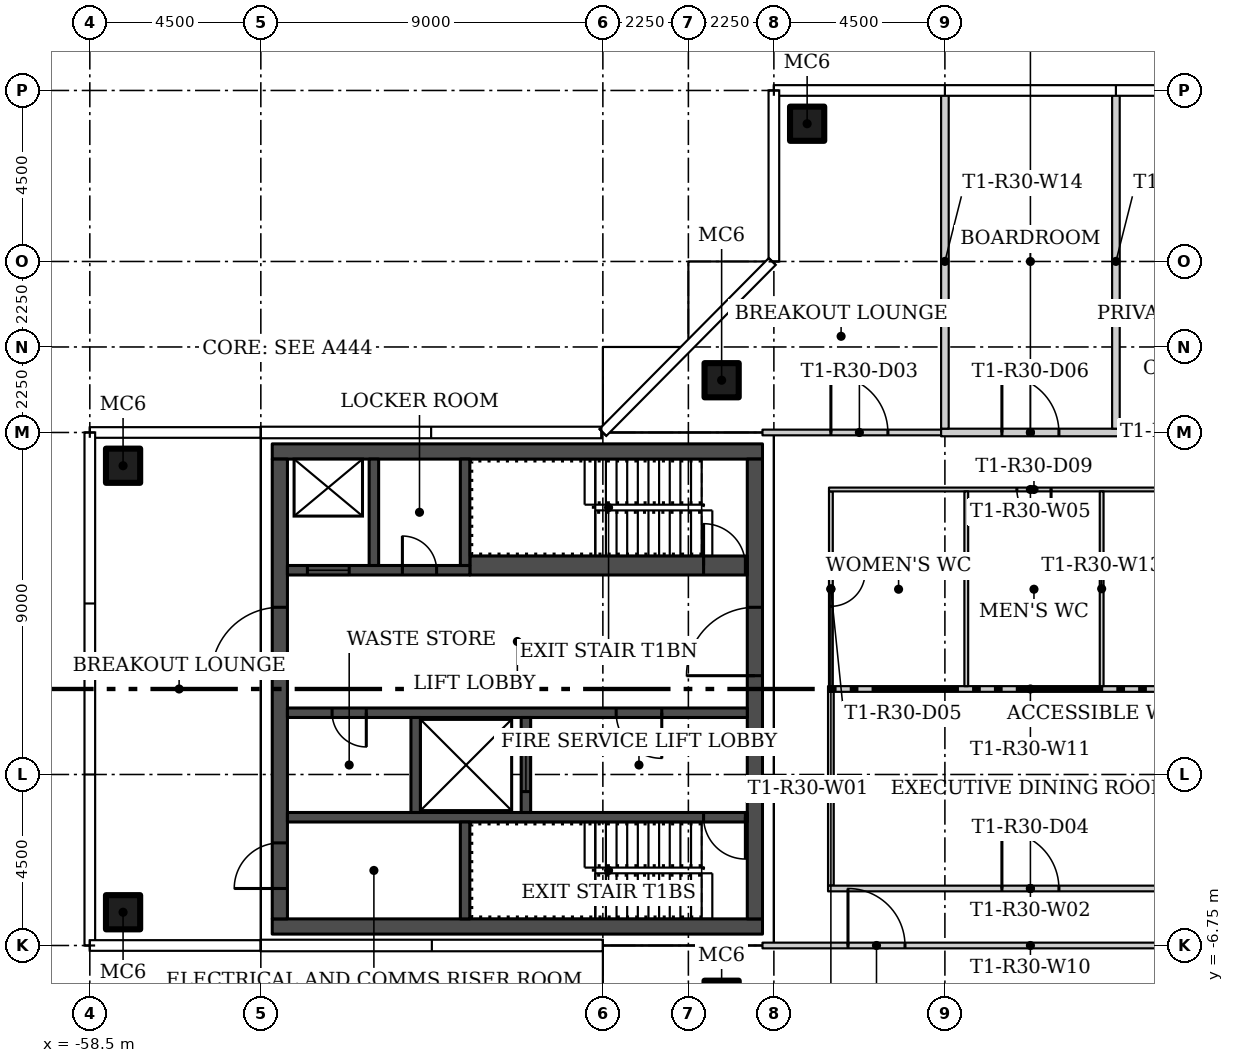
"""IFC4 building model, lengths in metres.
Left out: names, types, materials, properties, quantities, classifications, styles, units other than length and angle.
Written with IfcOpenShell. Run it as: python <this file> out.ifc"""

import sys

from ifc_helpers import new_model, si_unit, direction, frame, frame_2d, origin, origin_2d, place, context, subcontext, project, spatial, rectangle, hollow_rectangle, extrude, element, fill, save


model = new_model("IFC4")
c1 = context("Model", 3, precision=1e-05, world=origin(), true_north=direction((0.0, 1.0)))
c2 = subcontext(c1, "Body", "Model", "MODEL_VIEW")
j1 = project(units=[si_unit("LENGTHUNIT", "METRE"), si_unit("PLANEANGLEUNIT", "RADIAN")], contexts=[c1])
p1 = place(None, origin())
s1 = spatial("IfcSite", under=j1, at=p1, CompositionType="ELEMENT")
p2 = place(p1, origin())
s2 = spatial("IfcBuilding", under=s1, at=p2, CompositionType="ELEMENT")
p3 = place(p2, frame((0.0, 0.0, 269.4)))
s3 = spatial("IfcBuildingStorey", under=s2, at=p3, CompositionType="ELEMENT", Elevation=269.4)
for number, where in (
    (1, (-41.875, 8.125, 0.0)),
    (2, (-41.875, -8.125, 0.0)),
    (3, (-57.625, -5.875, 0.0)),
    (4, (-57.625, 5.875, 0.0)),
    (5, (-39.625, 14.875, 0.0)),
):
    element("IfcColumn", number, at=place(p3, frame(where)), inside=s3, PredefinedType="COLUMN", context=c2, shape_type="SweptSolid", body=[
        extrude(hollow_rectangle(XDim=0.9, YDim=0.9, WallThickness=0.036, at=origin_2d()), origin(), (0.0, 0.0, 1.0), 3.45),
    ])
p4 = place(p3, frame((-39.0, -0.075, 0.0), z_axis=(0.0, 0.0, 1.0), x_axis=(0.0, -1.0, 0.0)))
e6 = element("IfcWall", 6, at=p4, inside=s3, PredefinedType="PARTITIONING", context=c2, shape_type="SweptSolid", body=[
    extrude(rectangle(XDim=5.1, YDim=0.15, at=frame_2d((2.55, 0.0))), origin(), (0.0, 0.0, 1.0), 3.45),
])
p5 = place(p3, frame((-39.075, -5.25, 0.0)))
e7 = element("IfcWall", 7, at=p5, inside=s3, PredefinedType="PARTITIONING", context=c2, shape_type="SweptSolid", body=[
    extrude(rectangle(XDim=10.65, YDim=0.15, at=frame_2d((5.325, 0.0))), origin(), (0.0, 0.0, 1.0), 3.45),
])
p6 = place(p5, frame((4.575, 0.0, 0.0)))
e8 = element("IfcOpeningElement", 8, at=p6, cuts=e7, PredefinedType="OPENING", context=c2, shape_type="SweptSolid", body=[
    extrude(rectangle(XDim=1.5, YDim=2.1, at=frame_2d((0.75, 1.05))), frame((0.0, 0.085, 0.0), z_axis=(0.0, -1.0, 0.0), x_axis=(1.0, 0.0, 0.0)), (0.0, 0.0, 1.0), 0.17),
])
p7 = place(p3, frame((-39.0, 5.2, 0.0), z_axis=(0.0, 0.0, 1.0), x_axis=(0.0, -1.0, 0.0)))
e9 = element("IfcWall", 9, at=p7, inside=s3, PredefinedType="PARTITIONING", context=c2, shape_type="SweptSolid", body=[
    extrude(rectangle(XDim=5.125, YDim=0.1, at=frame_2d((2.562, 0.0))), origin(), (0.0, 0.0, 1.0), 3.45),
])
p8 = place(p7, frame((2.125, 0.0, 0.0)))
e10 = element("IfcOpeningElement", 10, at=p8, cuts=e9, PredefinedType="OPENING", context=c2, shape_type="SweptSolid", body=[
    extrude(rectangle(XDim=0.9, YDim=2.1, at=frame_2d((0.45, 1.05))), frame((0.0, 0.06, 0.0), z_axis=(0.0, -1.0, 0.0), x_axis=(1.0, 0.0, 0.0)), (0.0, 0.0, 1.0), 0.12),
])
p9 = place(p3, frame((-28.45, 5.25, 0.0), z_axis=(0.0, 0.0, 1.0), x_axis=(-1.0, 0.0, 0.0)))
e11 = element("IfcWall", 11, at=p9, inside=s3, PredefinedType="PARTITIONING", context=c2, shape_type="SweptSolid", body=[
    extrude(rectangle(XDim=10.6, YDim=0.1, at=frame_2d((5.3, 0.0))), origin(), (0.0, 0.0, 1.0), 3.45),
])
p10 = place(p9, frame((4.756, 0.0, 0.0)))
e12 = element("IfcOpeningElement", 12, at=p10, cuts=e11, PredefinedType="OPENING", context=c2, shape_type="SweptSolid", body=[
    extrude(rectangle(XDim=0.9, YDim=2.1, at=frame_2d((0.45, 1.05))), frame((0.0, 0.06, 0.0), z_axis=(0.0, -1.0, 0.0), x_axis=(1.0, 0.0, 0.0)), (0.0, 0.0, 1.0), 0.12),
])
p11 = place(p3, frame((-40.8, 6.75, 0.0)))
e13 = element("IfcWall", 13, at=p11, inside=s3, PredefinedType="PARTITIONING", context=c2, shape_type="SweptSolid", body=[
    extrude(rectangle(XDim=4.9, YDim=0.15, at=frame_2d((2.45, 0.0))), origin(), (0.0, 0.0, 1.0), 3.45),
])
p12 = place(p11, frame((1.8, 0.0, 0.0)))
e14 = element("IfcOpeningElement", 14, at=p12, cuts=e13, PredefinedType="OPENING", context=c2, shape_type="SweptSolid", body=[
    extrude(rectangle(XDim=1.5, YDim=2.1, at=frame_2d((0.75, 1.05))), frame((0.0, 0.085, 0.0), z_axis=(0.0, -1.0, 0.0), x_axis=(1.0, 0.0, 0.0)), (0.0, 0.0, 1.0), 0.17),
])
p13 = place(p3, frame((-31.6, 6.75, 0.0)))
e15 = element("IfcWall", 15, at=p13, inside=s3, PredefinedType="PARTITIONING", context=c2, shape_type="SweptSolid", body=[
    extrude(rectangle(XDim=4.9, YDim=0.15, at=frame_2d((2.45, 0.0))), origin(), (0.0, 0.0, 1.0), 3.45),
])
p14 = place(p13, frame((1.85, 0.0, 0.0)))
e16 = element("IfcOpeningElement", 16, at=p14, cuts=e15, PredefinedType="OPENING", context=c2, shape_type="SweptSolid", body=[
    extrude(rectangle(XDim=1.0, YDim=2.4, at=frame_2d((0.5, 1.2))), frame((0.0, 0.085, 0.0), z_axis=(0.0, -1.0, 0.0), x_axis=(1.0, 0.0, 0.0)), (0.0, 0.0, 1.0), 0.17),
])
p15 = place(p3, frame((-36.1, 6.75, 0.0)))
e17 = element("IfcWall", 17, at=p15, inside=s3, PredefinedType="PARTITIONING", context=c2, shape_type="SweptSolid", body=[
    extrude(rectangle(XDim=4.7, YDim=0.2, at=frame_2d((2.35, 0.0))), origin(), (0.0, 0.0, 1.0), 3.45),
])
p16 = place(p15, frame((1.6, 0.0, 0.0)))
e18 = element("IfcOpeningElement", 18, at=p16, cuts=e17, PredefinedType="OPENING", context=c2, shape_type="SweptSolid", body=[
    extrude(rectangle(XDim=1.5, YDim=2.4, at=frame_2d((0.75, 1.2))), frame((0.0, 0.11, 0.0), z_axis=(0.0, -1.0, 0.0), x_axis=(1.0, 0.0, 0.0)), (0.0, 0.0, 1.0), 0.22),
])
p17 = place(p3, frame((-40.8, -6.75, 0.0)))
e19 = element("IfcWall", 19, at=p17, inside=s3, PredefinedType="PARTITIONING", context=c2, shape_type="SweptSolid", body=[
    extrude(rectangle(XDim=14.1, YDim=0.15, at=frame_2d((7.05, 0.0))), origin(), (0.0, 0.0, 1.0), 3.45),
])
p18 = place(p17, frame((2.25, 0.0, 0.0)))
e20 = element("IfcOpeningElement", 20, at=p18, cuts=e19, PredefinedType="OPENING", context=c2, shape_type="SweptSolid", body=[
    extrude(rectangle(XDim=1.5, YDim=2.1, at=frame_2d((0.75, 1.05))), frame((0.0, 0.085, 0.0), z_axis=(0.0, -1.0, 0.0), x_axis=(1.0, 0.0, 0.0)), (0.0, 0.0, 1.0), 0.17),
])
p19 = place(p17, frame((10.35, 0.0, 0.0)))
e21 = element("IfcOpeningElement", 21, at=p19, cuts=e19, PredefinedType="OPENING", context=c2, shape_type="SweptSolid", body=[
    extrude(rectangle(XDim=1.5, YDim=2.1, at=frame_2d((0.75, 1.05))), frame((0.0, 0.085, 0.0), z_axis=(0.0, -1.0, 0.0), x_axis=(1.0, 0.0, 0.0)), (0.0, 0.0, 1.0), 0.17),
])
p20 = place(p3, frame((-28.425, 0.0, 0.0), z_axis=(0.0, 0.0, 1.0), x_axis=(-1.0, 0.0, 0.0)))
e22 = element("IfcWall", 22, at=p20, inside=s3, PredefinedType="PARTITIONING", context=c2, shape_type="SweptSolid", body=[
    extrude(rectangle(XDim=10.65, YDim=0.15, at=frame_2d((5.325, 0.0))), origin(), (0.0, 0.0, 1.0), 3.45),
])
for number, where, z_axis, x_axis in (
    (23, (-35.438, 0.075, 0.0), (0.0, 0.0, 1.0), (0.0, 1.0, 0.0)),
    (24, (-31.875, 0.075, 0.0), (0.0, 0.0, 1.0), (0.0, 1.0, 0.0)),
):
    element("IfcWall", number, at=place(p3, frame(where, z_axis=z_axis, x_axis=x_axis)), inside=s3, PredefinedType="PARTITIONING", context=c2, shape_type="SweptSolid", body=[
        extrude(rectangle(XDim=5.125, YDim=0.1, at=frame_2d((2.562, 0.0))), origin(), (0.0, 0.0, 1.0), 3.45),
    ])
for number, where, z_axis, x_axis in (
    (25, (-36.0, 6.85, 0.0), (0.0, 0.0, 1.0), (0.0, 1.0, 0.0)),
    (26, (-31.5, 6.85, 0.0), (0.0, 0.0, 1.0), (0.0, 1.0, 0.0)),
):
    element("IfcWall", number, at=place(p3, frame(where, z_axis=z_axis, x_axis=x_axis)), inside=s3, PredefinedType="PARTITIONING", context=c2, shape_type="SweptSolid", body=[
        extrude(rectangle(XDim=8.805, YDim=0.2, at=frame_2d((4.402, 0.0))), origin(), (0.0, 0.0, 1.0), 3.45),
    ])
for number, where, z_axis, x_axis in (
    (27, (-40.8, -6.25, 0.0), (0.0, 0.0, 1.0), (-1.0, 0.0, 0.0)),
    (28, (-40.8, 6.25, 0.0), (0.0, 0.0, 1.0), (-1.0, 0.0, 0.0)),
):
    element("IfcWall", number, at=place(p3, frame(where, z_axis=z_axis, x_axis=x_axis)), inside=s3, PredefinedType="SHEAR", context=c2, shape_type="SweptSolid", body=[
        extrude(rectangle(XDim=12.9, YDim=0.4, at=frame_2d((6.45, 0.0))), origin(), (0.0, 0.0, 1.0), 3.45),
    ])
p21 = place(p3, frame((-41.0, -6.05, 0.0), z_axis=(0.0, 0.0, 1.0), x_axis=(0.0, 1.0, 0.0)))
e29 = element("IfcWall", 29, at=p21, inside=s3, PredefinedType="SHEAR", context=c2, shape_type="SweptSolid", body=[
    extrude(rectangle(XDim=12.1, YDim=0.4, at=frame_2d((6.05, 0.0))), origin(), (0.0, 0.0, 1.0), 3.45),
])
p22 = place(p21, frame((6.4, 0.0, 0.0)))
e30 = element("IfcOpeningElement", 30, at=p22, cuts=e29, PredefinedType="OPENING", context=c2, shape_type="SweptSolid", body=[
    extrude(rectangle(XDim=1.8, YDim=2.4, at=frame_2d((0.9, 1.2))), frame((0.0, 0.21, 0.0), z_axis=(0.0, -1.0, 0.0), x_axis=(1.0, 0.0, 0.0)), (0.0, 0.0, 1.0), 0.42),
])
p23 = place(p3, frame((-53.5, -6.05, 0.0), z_axis=(0.0, 0.0, 1.0), x_axis=(0.0, 1.0, 0.0)))
e31 = element("IfcWall", 31, at=p23, inside=s3, PredefinedType="SHEAR", context=c2, shape_type="SweptSolid", body=[
    extrude(rectangle(XDim=12.1, YDim=0.4, at=frame_2d((6.05, 0.0))), origin(), (0.0, 0.0, 1.0), 3.45),
])
p24 = place(p23, frame((0.8, 0.0, 0.0)))
e32 = element("IfcOpeningElement", 32, at=p24, cuts=e31, PredefinedType="OPENING", context=c2, shape_type="SweptSolid", body=[
    extrude(rectangle(XDim=1.2, YDim=2.1, at=frame_2d((0.6, 1.05))), frame((0.0, 0.21, 0.0), z_axis=(0.0, -1.0, 0.0), x_axis=(1.0, 0.0, 0.0)), (0.0, 0.0, 1.0), 0.42),
])
p25 = place(p23, frame((6.4, 0.0, 0.0)))
e33 = element("IfcOpeningElement", 33, at=p25, cuts=e31, PredefinedType="OPENING", context=c2, shape_type="SweptSolid", body=[
    extrude(rectangle(XDim=1.8, YDim=2.4, at=frame_2d((0.9, 1.2))), frame((0.0, 0.21, 0.0), z_axis=(0.0, -1.0, 0.0), x_axis=(1.0, 0.0, 0.0)), (0.0, 0.0, 1.0), 0.42),
])
p26 = place(p3, frame((-41.2, -3.375, 0.0), z_axis=(0.0, 0.0, 1.0), x_axis=(-1.0, 0.0, 0.0)))
e34 = element("IfcWall", 34, at=p26, inside=s3, PredefinedType="SHEAR", context=c2, shape_type="SweptSolid", body=[
    extrude(rectangle(XDim=12.1, YDim=0.25, at=frame_2d((6.05, 0.0))), origin(), (0.0, 0.0, 1.0), 3.45),
])
p27 = place(p26, frame((0.05, 0.0, 0.0)))
e35 = element("IfcOpeningElement", 35, at=p27, cuts=e34, PredefinedType="OPENING", context=c2, shape_type="SweptSolid", body=[
    extrude(rectangle(XDim=1.1, YDim=2.1, at=frame_2d((0.55, 1.05))), frame((0.0, 0.135, 0.0), z_axis=(0.0, -1.0, 0.0), x_axis=(1.0, 0.0, 0.0)), (0.0, 0.0, 1.0), 0.27),
])
p28 = place(p3, frame((-48.625, -6.05, 0.0), z_axis=(0.0, 0.0, 1.0), x_axis=(0.0, 1.0, 0.0)))
e36 = element("IfcWall", 36, at=p28, inside=s3, PredefinedType="SHEAR", context=c2, shape_type="SweptSolid", body=[
    extrude(rectangle(XDim=2.55, YDim=0.25, at=frame_2d((1.275, 0.0))), origin(), (0.0, 0.0, 1.0), 3.45),
])
p29 = place(p3, frame((-41.2, -0.625, 0.0), z_axis=(0.0, 0.0, 1.0), x_axis=(-1.0, 0.0, 0.0)))
e37 = element("IfcWall", 37, at=p29, inside=s3, PredefinedType="SHEAR", context=c2, shape_type="SweptSolid", body=[
    extrude(rectangle(XDim=12.1, YDim=0.25, at=frame_2d((6.05, 0.0))), origin(), (0.0, 0.0, 1.0), 3.45),
])
p30 = place(p29, frame((2.25, 0.0, 0.0)))
e38 = element("IfcOpeningElement", 38, at=p30, cuts=e37, PredefinedType="OPENING", context=c2, shape_type="SweptSolid", body=[
    extrude(rectangle(XDim=1.2, YDim=2.1, at=frame_2d((0.6, 1.05))), frame((0.0, 0.135, 0.0), z_axis=(0.0, -1.0, 0.0), x_axis=(1.0, 0.0, 0.0)), (0.0, 0.0, 1.0), 0.27),
])
p31 = place(p29, frame((10.025, 0.0, 0.0)))
e39 = element("IfcOpeningElement", 39, at=p31, cuts=e37, PredefinedType="OPENING", context=c2, shape_type="SweptSolid", body=[
    extrude(rectangle(XDim=0.9, YDim=2.1, at=frame_2d((0.45, 1.05))), frame((0.0, 0.135, 0.0), z_axis=(0.0, -1.0, 0.0), x_axis=(1.0, 0.0, 0.0)), (0.0, 0.0, 1.0), 0.27),
])
p32 = place(p3, frame((-47.025, -3.25, 0.0), z_axis=(0.0, 0.0, 1.0), x_axis=(0.0, 1.0, 0.0)))
e40 = element("IfcWall", 40, at=p32, inside=s3, PredefinedType="SHEAR", context=c2, shape_type="SweptSolid", body=[
    extrude(rectangle(XDim=2.5, YDim=0.25, at=frame_2d((1.25, 0.0))), origin(), (0.0, 0.0, 1.0), 3.45),
])
p33 = place(p32, frame((0.55, 0.0, 0.0)))
e41 = element("IfcOpeningElement", 41, at=p33, cuts=e40, PredefinedType="OPENING", context=c2, shape_type="SweptSolid", body=[
    extrude(rectangle(XDim=1.4, YDim=2.4, at=frame_2d((0.7, 1.2))), frame((0.0, 0.135, 0.0), z_axis=(0.0, -1.0, 0.0), x_axis=(1.0, 0.0, 0.0)), (0.0, 0.0, 1.0), 0.27),
])
p34 = place(p3, frame((-49.925, -3.25, 0.0), z_axis=(0.0, 0.0, 1.0), x_axis=(0.0, 1.0, 0.0)))
e42 = element("IfcWall", 42, at=p34, inside=s3, PredefinedType="SHEAR", context=c2, shape_type="SweptSolid", body=[
    extrude(rectangle(XDim=2.5, YDim=0.25, at=frame_2d((1.25, 0.0))), origin(), (0.0, 0.0, 1.0), 3.45),
])
p35 = place(p3, frame((-48.5, 3.25, 0.0)))
e43 = element("IfcWall", 43, at=p35, inside=s3, PredefinedType="SHEAR", context=c2, shape_type="SweptSolid", body=[
    extrude(rectangle(XDim=7.3, YDim=0.5, at=frame_2d((3.65, 0.0))), origin(), (0.0, 0.0, 1.0), 3.45),
])
p36 = place(p35, frame((6.15, 0.0, 0.0)))
e44 = element("IfcOpeningElement", 44, at=p36, cuts=e43, PredefinedType="OPENING", context=c2, shape_type="SweptSolid", body=[
    extrude(rectangle(XDim=1.1, YDim=2.1, at=frame_2d((0.55, 1.05))), frame((0.0, 0.26, 0.0), z_axis=(0.0, -1.0, 0.0), x_axis=(1.0, 0.0, 0.0)), (0.0, 0.0, 1.0), 0.52),
])
p37 = place(p3, frame((-53.3, 3.125, 0.0)))
e45 = element("IfcWall", 45, at=p37, inside=s3, PredefinedType="SHEAR", context=c2, shape_type="SweptSolid", body=[
    extrude(rectangle(XDim=4.8, YDim=0.25, at=frame_2d((2.4, 0.0))), origin(), (0.0, 0.0, 1.0), 3.45),
])
p38 = place(p37, frame((0.525, 0.0, 0.0)))
e46 = element("IfcOpeningElement", 46, at=p38, cuts=e45, PredefinedType="OPENING", context=c2, shape_type="SweptSolid", body=[
    extrude(rectangle(XDim=1.1, YDim=2.1, at=frame_2d((0.55, 1.05))), frame((0.0, 0.135, 0.0), z_axis=(0.0, -1.0, 0.0), x_axis=(1.0, 0.0, 0.0)), (0.0, 0.0, 1.0), 0.27),
])
p39 = place(p37, frame((3.025, 0.0, 0.0)))
e47 = element("IfcOpeningElement", 47, at=p39, cuts=e45, PredefinedType="OPENING", context=c2, shape_type="SweptSolid", body=[
    extrude(rectangle(XDim=0.9, YDim=2.1, at=frame_2d((0.45, 1.05))), frame((0.0, 0.135, 0.0), z_axis=(0.0, -1.0, 0.0), x_axis=(1.0, 0.0, 0.0)), (0.0, 0.0, 1.0), 0.27),
])
for number, where, z_axis, x_axis in (
    (48, (-48.625, 3.25, 0.0), (0.0, 0.0, 1.0), (0.0, 1.0, 0.0)),
    (49, (-51.025, 3.25, 0.0), (0.0, 0.0, 1.0), (0.0, 1.0, 0.0)),
):
    element("IfcWall", number, at=place(p3, frame(where, z_axis=z_axis, x_axis=x_axis)), inside=s3, PredefinedType="SHEAR", context=c2, shape_type="SweptSolid", body=[
        extrude(rectangle(XDim=2.8, YDim=0.25, at=frame_2d((1.4, 0.0))), origin(), (0.0, 0.0, 1.0), 3.45),
    ])
p40 = place(p18, origin())
e50 = element("IfcDoor", 50, at=p40, inside=s3, OperationType="DOUBLE_DOOR_SINGLE_SWING", PredefinedType="DOOR", context=c2, shape_type="SweptSolid", body=[
    extrude(rectangle(XDim=1.5, YDim=2.1, at=frame_2d((0.75, 1.05))), frame((0.0, 0.025, 0.0), z_axis=(0.0, -1.0, 0.0), x_axis=(1.0, 0.0, 0.0)), (0.0, 0.0, 1.0), 0.05),
])
fill(e20, e50)
p41 = place(p12, origin())
e51 = element("IfcDoor", 51, at=p41, inside=s3, OperationType="DOUBLE_DOOR_SINGLE_SWING", PredefinedType="DOOR", context=c2, shape_type="SweptSolid", body=[
    extrude(rectangle(XDim=1.5, YDim=2.1, at=frame_2d((0.75, 1.05))), frame((0.0, 0.025, 0.0), z_axis=(0.0, -1.0, 0.0), x_axis=(1.0, 0.0, 0.0)), (0.0, 0.0, 1.0), 0.05),
])
fill(e14, e51)
p42 = place(p6, origin())
e52 = element("IfcDoor", 52, at=p42, inside=s3, OperationType="DOUBLE_DOOR_SINGLE_SWING", PredefinedType="DOOR", context=c2, shape_type="SweptSolid", body=[
    extrude(rectangle(XDim=1.5, YDim=2.1, at=frame_2d((0.75, 1.05))), frame((0.0, 0.025, 0.0), z_axis=(0.0, -1.0, 0.0), x_axis=(1.0, 0.0, 0.0)), (0.0, 0.0, 1.0), 0.05),
])
fill(e8, e52)
p43 = place(p8, origin())
e53 = element("IfcDoor", 53, at=p43, inside=s3, OperationType="SINGLE_SWING_LEFT", PredefinedType="DOOR", context=c2, shape_type="SweptSolid", body=[
    extrude(rectangle(XDim=0.9, YDim=2.1, at=frame_2d((0.45, 1.05))), frame((0.0, 0.025, 0.0), z_axis=(0.0, -1.0, 0.0), x_axis=(1.0, 0.0, 0.0)), (0.0, 0.0, 1.0), 0.05),
])
fill(e10, e53)
p44 = place(p16, origin())
e54 = element("IfcDoor", 54, at=p44, inside=s3, OperationType="DOUBLE_DOOR_SINGLE_SWING", PredefinedType="DOOR", context=c2, shape_type="SweptSolid", body=[
    extrude(rectangle(XDim=1.5, YDim=2.4, at=frame_2d((0.75, 1.2))), frame((0.0, 0.025, 0.0), z_axis=(0.0, -1.0, 0.0), x_axis=(1.0, 0.0, 0.0)), (0.0, 0.0, 1.0), 0.05),
])
fill(e18, e54)
p45 = place(p10, origin())
e55 = element("IfcDoor", 55, at=p45, inside=s3, OperationType="SINGLE_SWING_LEFT", PredefinedType="DOOR", context=c2, shape_type="SweptSolid", body=[
    extrude(rectangle(XDim=0.9, YDim=2.1, at=frame_2d((0.45, 1.05))), frame((0.0, 0.025, 0.0), z_axis=(0.0, -1.0, 0.0), x_axis=(1.0, 0.0, 0.0)), (0.0, 0.0, 1.0), 0.05),
])
fill(e12, e55)
p46 = place(p22, origin())
e56 = element("IfcDoor", 56, at=p46, inside=s3, OperationType="DOUBLE_DOOR_SINGLE_SWING", PredefinedType="DOOR", context=c2, shape_type="SweptSolid", body=[
    extrude(rectangle(XDim=1.8, YDim=2.4, at=frame_2d((0.9, 1.2))), frame((0.0, 0.025, 0.0), z_axis=(0.0, -1.0, 0.0), x_axis=(1.0, 0.0, 0.0)), (0.0, 0.0, 1.0), 0.05),
])
fill(e30, e56)
p47 = place(p24, origin())
e57 = element("IfcDoor", 57, at=p47, inside=s3, OperationType="SINGLE_SWING_LEFT", PredefinedType="DOOR", context=c2, shape_type="SweptSolid", body=[
    extrude(rectangle(XDim=1.2, YDim=2.1, at=frame_2d((0.6, 1.05))), frame((0.0, 0.025, 0.0), z_axis=(0.0, -1.0, 0.0), x_axis=(1.0, 0.0, 0.0)), (0.0, 0.0, 1.0), 0.05),
])
fill(e32, e57)
p48 = place(p25, origin())
e58 = element("IfcDoor", 58, at=p48, inside=s3, OperationType="DOUBLE_DOOR_SINGLE_SWING", PredefinedType="DOOR", context=c2, shape_type="SweptSolid", body=[
    extrude(rectangle(XDim=1.8, YDim=2.4, at=frame_2d((0.9, 1.2))), frame((0.0, 0.025, 0.0), z_axis=(0.0, -1.0, 0.0), x_axis=(1.0, 0.0, 0.0)), (0.0, 0.0, 1.0), 0.05),
])
fill(e33, e58)
p49 = place(p27, origin())
e59 = element("IfcDoor", 59, at=p49, inside=s3, OperationType="SINGLE_SWING_LEFT", PredefinedType="DOOR", context=c2, shape_type="SweptSolid", body=[
    extrude(rectangle(XDim=1.1, YDim=2.1, at=frame_2d((0.55, 1.05))), frame((0.0, 0.025, 0.0), z_axis=(0.0, -1.0, 0.0), x_axis=(1.0, 0.0, 0.0)), (0.0, 0.0, 1.0), 0.05),
])
fill(e35, e59)
p50 = place(p30, origin())
e60 = element("IfcDoor", 60, at=p50, inside=s3, OperationType="SINGLE_SWING_LEFT", PredefinedType="DOOR", context=c2, shape_type="SweptSolid", body=[
    extrude(rectangle(XDim=1.2, YDim=2.1, at=frame_2d((0.6, 1.05))), frame((0.0, 0.025, 0.0), z_axis=(0.0, -1.0, 0.0), x_axis=(1.0, 0.0, 0.0)), (0.0, 0.0, 1.0), 0.05),
])
fill(e38, e60)
p51 = place(p31, origin())
e61 = element("IfcDoor", 61, at=p51, inside=s3, OperationType="SINGLE_SWING_RIGHT", PredefinedType="DOOR", context=c2, shape_type="SweptSolid", body=[
    extrude(rectangle(XDim=0.9, YDim=2.1, at=frame_2d((0.45, 1.05))), frame((0.0, 0.025, 0.0), z_axis=(0.0, -1.0, 0.0), x_axis=(1.0, 0.0, 0.0)), (0.0, 0.0, 1.0), 0.05),
])
fill(e39, e61)
p52 = place(p33, origin())
e62 = element("IfcDoor", 62, at=p52, inside=s3, OperationType="SLIDING_TO_LEFT", PredefinedType="DOOR", context=c2, shape_type="SweptSolid", body=[
    extrude(rectangle(XDim=1.4, YDim=2.4, at=frame_2d((0.7, 1.2))), frame((0.0, 0.025, 0.0), z_axis=(0.0, -1.0, 0.0), x_axis=(1.0, 0.0, 0.0)), (0.0, 0.0, 1.0), 0.05),
])
fill(e41, e62)
p53 = place(p36, origin())
e63 = element("IfcDoor", 63, at=p53, inside=s3, OperationType="SINGLE_SWING_RIGHT", PredefinedType="DOOR", context=c2, shape_type="SweptSolid", body=[
    extrude(rectangle(XDim=1.1, YDim=2.1, at=frame_2d((0.55, 1.05))), frame((0.0, 0.025, 0.0), z_axis=(0.0, -1.0, 0.0), x_axis=(1.0, 0.0, 0.0)), (0.0, 0.0, 1.0), 0.05),
])
fill(e44, e63)
p54 = place(p38, origin())
e64 = element("IfcDoor", 64, at=p54, inside=s3, OperationType="SLIDING_TO_LEFT", PredefinedType="DOOR", context=c2, shape_type="SweptSolid", body=[
    extrude(rectangle(XDim=1.1, YDim=2.1, at=frame_2d((0.55, 1.05))), frame((0.0, 0.025, 0.0), z_axis=(0.0, -1.0, 0.0), x_axis=(1.0, 0.0, 0.0)), (0.0, 0.0, 1.0), 0.05),
])
fill(e46, e64)
p55 = place(p39, origin())
e65 = element("IfcDoor", 65, at=p55, inside=s3, OperationType="SINGLE_SWING_RIGHT", PredefinedType="DOOR", context=c2, shape_type="SweptSolid", body=[
    extrude(rectangle(XDim=0.9, YDim=2.1, at=frame_2d((0.45, 1.05))), frame((0.0, 0.025, 0.0), z_axis=(0.0, -1.0, 0.0), x_axis=(1.0, 0.0, 0.0)), (0.0, 0.0, 1.0), 0.05),
])
fill(e47, e65)
save(model, sys.argv[1])
